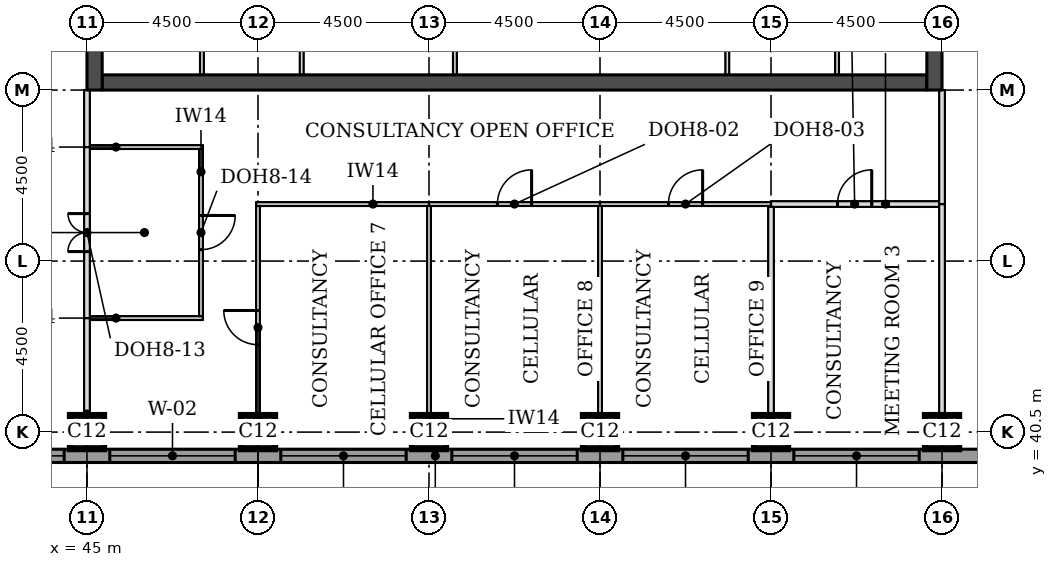
"""IFC4 building model, lengths in metres.
Left out: names, types, materials, properties, quantities, classifications, styles, units other than length and angle.
Written with IfcOpenShell. Run it as: python <this file> out.ifc"""

import sys

from ifc_helpers import new_model, si_unit, direction, frame, frame_2d, origin, origin_2d, place, context, subcontext, project, spatial, rectangle, extrude, element, fill, save


model = new_model("IFC4")
c1 = context("Model", 3, precision=1e-05, world=origin(), true_north=direction((0.0, 1.0)))
c2 = subcontext(c1, "Body", "Model", "MODEL_VIEW")
j1 = project(units=[si_unit("LENGTHUNIT", "METRE"), si_unit("PLANEANGLEUNIT", "RADIAN")], contexts=[c1])
p1 = place(None, origin())
s1 = spatial("IfcSite", under=j1, at=p1, CompositionType="ELEMENT")
p2 = place(p1, origin())
s2 = spatial("IfcBuilding", under=s1, at=p2, CompositionType="ELEMENT")
p3 = place(p2, frame((0.0, 0.0, 199.5)))
s3 = spatial("IfcBuildingStorey", under=s2, at=p3, CompositionType="ELEMENT", Elevation=199.5)
for number, where, z_axis, x_axis in (
    (1, (45.0, 40.5, 0.0), (0.0, 0.0, 1.0), (1.0, 0.0, 0.0)),
    (2, (49.5, 40.5, 0.0), (0.0, 0.0, 1.0), (1.0, 0.0, 0.0)),
    (3, (54.0, 40.5, 0.0), (0.0, 0.0, 1.0), (1.0, 0.0, 0.0)),
    (4, (58.5, 40.5, 0.0), (0.0, 0.0, 1.0), (1.0, 0.0, 0.0)),
    (5, (63.0, 40.5, 0.0), (0.0, 0.0, 1.0), (1.0, 0.0, 0.0)),
    (6, (67.5, 40.5, 0.0), (0.0, 0.0, 1.0), (1.0, 0.0, 0.0)),
):
    element("IfcColumn", number, at=place(p3, frame(where, z_axis=z_axis, x_axis=x_axis)), inside=s3, PredefinedType="COLUMN", context=c2, shape_type="SweptSolid", body=[
        extrude(rectangle(XDim=0.9, YDim=0.9, at=origin_2d()), origin(), (0.0, 0.0, 1.0), 3.7),
    ])
p4 = place(p3, frame((45.4, 49.7, 0.0), z_axis=(0.0, 0.0, 1.0), x_axis=(1.0, 0.0, 0.0)))
e7 = element("IfcWall", 7, at=p4, inside=s3, PredefinedType="SHEAR", context=c2, shape_type="SweptSolid", body=[
    extrude(rectangle(XDim=21.7, YDim=0.4, at=frame_2d((10.85, 0.0))), origin(), (0.0, 0.0, 1.0), 3.7),
])
p5 = place(p3, frame((45.2, 49.5, 0.0), z_axis=(0.0, 0.0, 1.0), x_axis=(0.0, 1.0, 0.0)))
e8 = element("IfcWall", 8, at=p5, inside=s3, PredefinedType="SHEAR", context=c2, shape_type="SweptSolid", body=[
    extrude(rectangle(XDim=22.5, YDim=0.4, at=frame_2d((11.25, 0.0))), origin(), (0.0, 0.0, 1.0), 3.7),
])
p6 = place(p5, frame((4.2, 0.0, 0.0)))
e9 = element("IfcOpeningElement", 9, at=p6, cuts=e8, PredefinedType="OPENING", context=c2, shape_type="SweptSolid", body=[
    extrude(rectangle(XDim=1.8, YDim=2.1, at=frame_2d((0.9, 1.05))), frame((0.0, 0.21, 0.0), z_axis=(0.0, -1.0, 0.0), x_axis=(1.0, 0.0, 0.0)), (0.0, 0.0, 1.0), 0.42),
])
p7 = place(p5, frame((6.9, 0.0, 0.0)))
e10 = element("IfcOpeningElement", 10, at=p7, cuts=e8, PredefinedType="OPENING", context=c2, shape_type="SweptSolid", body=[
    extrude(rectangle(XDim=1.1, YDim=2.1, at=frame_2d((0.55, 1.05))), frame((0.0, 0.21, 0.0), z_axis=(0.0, -1.0, 0.0), x_axis=(1.0, 0.0, 0.0)), (0.0, 0.0, 1.0), 0.42),
])
p8 = place(p5, frame((13.6, 0.0, 0.0)))
e11 = element("IfcOpeningElement", 11, at=p8, cuts=e8, PredefinedType="OPENING", context=c2, shape_type="SweptSolid", body=[
    extrude(rectangle(XDim=1.1, YDim=2.1, at=frame_2d((0.55, 1.05))), frame((0.0, 0.21, 0.0), z_axis=(0.0, -1.0, 0.0), x_axis=(1.0, 0.0, 0.0)), (0.0, 0.0, 1.0), 0.42),
])
p9 = place(p5, frame((16.5, 0.0, 0.0)))
e12 = element("IfcOpeningElement", 12, at=p9, cuts=e8, PredefinedType="OPENING", context=c2, shape_type="SweptSolid", body=[
    extrude(rectangle(XDim=1.8, YDim=2.1, at=frame_2d((0.9, 1.05))), frame((0.0, 0.21, 0.0), z_axis=(0.0, -1.0, 0.0), x_axis=(1.0, 0.0, 0.0)), (0.0, 0.0, 1.0), 0.42),
])
p10 = place(p3, frame((67.3, 49.5, 0.0), z_axis=(0.0, 0.0, 1.0), x_axis=(0.0, 1.0, 0.0)))
e13 = element("IfcWall", 13, at=p10, inside=s3, PredefinedType="SHEAR", context=c2, shape_type="SweptSolid", body=[
    extrude(rectangle(XDim=22.5, YDim=0.4, at=frame_2d((11.25, 0.0))), origin(), (0.0, 0.0, 1.0), 3.7),
])
p11 = place(p10, frame((4.2, 0.0, 0.0)))
e14 = element("IfcOpeningElement", 14, at=p11, cuts=e13, PredefinedType="OPENING", context=c2, shape_type="SweptSolid", body=[
    extrude(rectangle(XDim=1.8, YDim=2.1, at=frame_2d((0.9, 1.05))), frame((0.0, 0.21, 0.0), z_axis=(0.0, -1.0, 0.0), x_axis=(1.0, 0.0, 0.0)), (0.0, 0.0, 1.0), 0.42),
])
p12 = place(p10, frame((6.9, 0.0, 0.0)))
e15 = element("IfcOpeningElement", 15, at=p12, cuts=e13, PredefinedType="OPENING", context=c2, shape_type="SweptSolid", body=[
    extrude(rectangle(XDim=1.1, YDim=2.1, at=frame_2d((0.55, 1.05))), frame((0.0, 0.21, 0.0), z_axis=(0.0, -1.0, 0.0), x_axis=(1.0, 0.0, 0.0)), (0.0, 0.0, 1.0), 0.42),
])
p13 = place(p10, frame((13.6, 0.0, 0.0)))
e16 = element("IfcOpeningElement", 16, at=p13, cuts=e13, PredefinedType="OPENING", context=c2, shape_type="SweptSolid", body=[
    extrude(rectangle(XDim=1.1, YDim=2.1, at=frame_2d((0.55, 1.05))), frame((0.0, 0.21, 0.0), z_axis=(0.0, -1.0, 0.0), x_axis=(1.0, 0.0, 0.0)), (0.0, 0.0, 1.0), 0.42),
])
p14 = place(p10, frame((16.5, 0.0, 0.0)))
e17 = element("IfcOpeningElement", 17, at=p14, cuts=e13, PredefinedType="OPENING", context=c2, shape_type="SweptSolid", body=[
    extrude(rectangle(XDim=1.8, YDim=2.1, at=frame_2d((0.9, 1.05))), frame((0.0, 0.21, 0.0), z_axis=(0.0, -1.0, 0.0), x_axis=(1.0, 0.0, 0.0)), (0.0, 0.0, 1.0), 0.42),
])
p15 = place(p3, frame((36.0, 39.875, 0.0), z_axis=(0.0, 0.0, 1.0), x_axis=(1.0, 0.0, 0.0)))
e18 = element("IfcWall", 18, at=p15, inside=s3, PredefinedType="STANDARD", context=c2, shape_type="SweptSolid", body=[
    extrude(rectangle(XDim=36.331, YDim=0.35, at=frame_2d((18.166, 0.0))), origin(), (0.0, 0.0, 1.0), 3.525),
])
p16 = place(p15, frame((5.1, 0.0, 0.9)))
e19 = element("IfcOpeningElement", 19, at=p16, cuts=e18, PredefinedType="OPENING", context=c2, shape_type="SweptSolid", body=[
    extrude(rectangle(XDim=3.3, YDim=1.9, at=frame_2d((1.65, 0.95))), frame((0.0, 0.185, 0.0), z_axis=(0.0, -1.0, 0.0), x_axis=(1.0, 0.0, 0.0)), (0.0, 0.0, 1.0), 0.37),
])
p17 = place(p15, frame((9.6, 0.0, 0.9)))
e20 = element("IfcOpeningElement", 20, at=p17, cuts=e18, PredefinedType="OPENING", context=c2, shape_type="SweptSolid", body=[
    extrude(rectangle(XDim=3.3, YDim=1.9, at=frame_2d((1.65, 0.95))), frame((0.0, 0.185, 0.0), z_axis=(0.0, -1.0, 0.0), x_axis=(1.0, 0.0, 0.0)), (0.0, 0.0, 1.0), 0.37),
])
p18 = place(p15, frame((14.1, 0.0, 0.9)))
e21 = element("IfcOpeningElement", 21, at=p18, cuts=e18, PredefinedType="OPENING", context=c2, shape_type="SweptSolid", body=[
    extrude(rectangle(XDim=3.3, YDim=1.9, at=frame_2d((1.65, 0.95))), frame((0.0, 0.185, 0.0), z_axis=(0.0, -1.0, 0.0), x_axis=(1.0, 0.0, 0.0)), (0.0, 0.0, 1.0), 0.37),
])
p19 = place(p15, frame((18.6, 0.0, 0.9)))
e22 = element("IfcOpeningElement", 22, at=p19, cuts=e18, PredefinedType="OPENING", context=c2, shape_type="SweptSolid", body=[
    extrude(rectangle(XDim=3.3, YDim=1.9, at=frame_2d((1.65, 0.95))), frame((0.0, 0.185, 0.0), z_axis=(0.0, -1.0, 0.0), x_axis=(1.0, 0.0, 0.0)), (0.0, 0.0, 1.0), 0.37),
])
p20 = place(p15, frame((23.1, 0.0, 0.9)))
e23 = element("IfcOpeningElement", 23, at=p20, cuts=e18, PredefinedType="OPENING", context=c2, shape_type="SweptSolid", body=[
    extrude(rectangle(XDim=3.3, YDim=1.9, at=frame_2d((1.65, 0.95))), frame((0.0, 0.185, 0.0), z_axis=(0.0, -1.0, 0.0), x_axis=(1.0, 0.0, 0.0)), (0.0, 0.0, 1.0), 0.37),
])
p21 = place(p15, frame((27.6, 0.0, 0.9)))
e24 = element("IfcOpeningElement", 24, at=p21, cuts=e18, PredefinedType="OPENING", context=c2, shape_type="SweptSolid", body=[
    extrude(rectangle(XDim=3.3, YDim=1.9, at=frame_2d((1.65, 0.95))), frame((0.0, 0.185, 0.0), z_axis=(0.0, -1.0, 0.0), x_axis=(1.0, 0.0, 0.0)), (0.0, 0.0, 1.0), 0.37),
])
p22 = place(p3, frame((45.075, 43.5, 0.0), z_axis=(0.0, 0.0, 1.0), x_axis=(1.0, 0.0, 0.0)))
e25 = element("IfcWall", 25, at=p22, inside=s3, PredefinedType="PARTITIONING", context=c2, shape_type="SweptSolid", body=[
    extrude(rectangle(XDim=2.975, YDim=0.1, at=frame_2d((1.488, 0.0))), origin(), (0.0, 0.0, 1.0), 3.55),
])
p23 = place(p3, frame((49.45, 46.5, 0.0), z_axis=(0.0, 0.0, 1.0), x_axis=(1.0, 0.0, 0.0)))
e26 = element("IfcWall", 26, at=p23, inside=s3, PredefinedType="PARTITIONING", context=c2, shape_type="SweptSolid", body=[
    extrude(rectangle(XDim=4.55, YDim=0.1, at=frame_2d((2.275, 0.0))), origin(), (0.0, 0.0, 1.0), 3.55),
])
p24 = place(p3, frame((54.0, 46.5, 0.0), z_axis=(0.0, 0.0, 1.0), x_axis=(1.0, 0.0, 0.0)))
e27 = element("IfcWall", 27, at=p24, inside=s3, PredefinedType="PARTITIONING", context=c2, shape_type="SweptSolid", body=[
    extrude(rectangle(XDim=4.5, YDim=0.1, at=frame_2d((2.25, 0.0))), origin(), (0.0, 0.0, 1.0), 3.55),
])
p25 = place(p24, frame((1.8, 0.0, 0.0)))
e28 = element("IfcOpeningElement", 28, at=p25, cuts=e27, PredefinedType="OPENING", context=c2, shape_type="SweptSolid", body=[
    extrude(rectangle(XDim=0.9, YDim=2.1, at=frame_2d((0.45, 1.05))), frame((0.0, 0.06, 0.0), z_axis=(0.0, -1.0, 0.0), x_axis=(1.0, 0.0, 0.0)), (0.0, 0.0, 1.0), 0.12),
])
p26 = place(p3, frame((58.5, 46.5, 0.0), z_axis=(0.0, 0.0, 1.0), x_axis=(1.0, 0.0, 0.0)))
e29 = element("IfcWall", 29, at=p26, inside=s3, PredefinedType="PARTITIONING", context=c2, shape_type="SweptSolid", body=[
    extrude(rectangle(XDim=4.5, YDim=0.1, at=frame_2d((2.25, 0.0))), origin(), (0.0, 0.0, 1.0), 3.55),
])
p27 = place(p26, frame((1.8, 0.0, 0.0)))
e30 = element("IfcOpeningElement", 30, at=p27, cuts=e29, PredefinedType="OPENING", context=c2, shape_type="SweptSolid", body=[
    extrude(rectangle(XDim=0.9, YDim=2.1, at=frame_2d((0.45, 1.05))), frame((0.0, 0.06, 0.0), z_axis=(0.0, -1.0, 0.0), x_axis=(1.0, 0.0, 0.0)), (0.0, 0.0, 1.0), 0.12),
])
p28 = place(p3, frame((63.0, 46.5, 0.0), z_axis=(0.0, 0.0, 1.0), x_axis=(1.0, 0.0, 0.0)))
e31 = element("IfcWall", 31, at=p28, inside=s3, PredefinedType="PARTITIONING", context=c2, shape_type="SweptSolid", body=[
    extrude(rectangle(XDim=4.425, YDim=0.15, at=frame_2d((2.212, 0.0))), origin(), (0.0, 0.0, 1.0), 3.55),
])
p29 = place(p28, frame((1.75, 0.0, 0.0)))
e32 = element("IfcOpeningElement", 32, at=p29, cuts=e31, PredefinedType="OPENING", context=c2, shape_type="SweptSolid", body=[
    extrude(rectangle(XDim=0.9, YDim=2.1, at=frame_2d((0.45, 1.05))), frame((0.0, 0.085, 0.0), z_axis=(0.0, -1.0, 0.0), x_axis=(1.0, 0.0, 0.0)), (0.0, 0.0, 1.0), 0.17),
])
p30 = place(p3, frame((45.075, 48.0, 0.0), z_axis=(0.0, 0.0, 1.0), x_axis=(1.0, 0.0, 0.0)))
e33 = element("IfcWall", 33, at=p30, inside=s3, PredefinedType="PARTITIONING", context=c2, shape_type="SweptSolid", body=[
    extrude(rectangle(XDim=2.975, YDim=0.1, at=frame_2d((1.488, 0.0))), origin(), (0.0, 0.0, 1.0), 3.55),
])
p31 = place(p3, frame((45.0, 40.05, 0.0), z_axis=(0.0, 0.0, 1.0), x_axis=(0.0, 1.0, 0.0)))
e34 = element("IfcWall", 34, at=p31, inside=s3, PredefinedType="PARTITIONING", context=c2, shape_type="SweptSolid", body=[
    extrude(rectangle(XDim=3.45, YDim=0.15, at=frame_2d((1.725, 0.0))), origin(), (0.0, 0.0, 1.0), 3.022),
])
p32 = place(p3, frame((49.5, 40.05, 0.0), z_axis=(0.0, 0.0, 1.0), x_axis=(0.0, 1.0, 0.0)))
e35 = element("IfcWall", 35, at=p32, inside=s3, PredefinedType="PARTITIONING", context=c2, shape_type="SweptSolid", body=[
    extrude(rectangle(XDim=6.4, YDim=0.1, at=frame_2d((3.2, 0.0))), origin(), (0.0, 0.0, 1.0), 3.55),
])
p33 = place(p32, frame((2.75, 0.0, 0.0)))
e36 = element("IfcOpeningElement", 36, at=p33, cuts=e35, PredefinedType="OPENING", context=c2, shape_type="SweptSolid", body=[
    extrude(rectangle(XDim=0.9, YDim=2.1, at=frame_2d((0.45, 1.05))), frame((0.0, 0.06, 0.0), z_axis=(0.0, -1.0, 0.0), x_axis=(1.0, 0.0, 0.0)), (0.0, 0.0, 1.0), 0.12),
])
for number, where, z_axis, x_axis in (
    (37, (54.0, 40.05, 0.0), (0.0, 0.0, 1.0), (0.0, 1.0, 0.0)),
    (38, (58.5, 40.05, 0.0), (0.0, 0.0, 1.0), (0.0, 1.0, 0.0)),
):
    element("IfcWall", number, at=place(p3, frame(where, z_axis=z_axis, x_axis=x_axis)), inside=s3, PredefinedType="PARTITIONING", context=c2, shape_type="SweptSolid", body=[
        extrude(rectangle(XDim=6.4, YDim=0.1, at=frame_2d((3.2, 0.0))), origin(), (0.0, 0.0, 1.0), 3.55),
    ])
p34 = place(p3, frame((63.0, 40.05, 0.0), z_axis=(0.0, 0.0, 1.0), x_axis=(0.0, 1.0, 0.0)))
e39 = element("IfcWall", 39, at=p34, inside=s3, PredefinedType="PARTITIONING", context=c2, shape_type="SweptSolid", body=[
    extrude(rectangle(XDim=6.375, YDim=0.15, at=frame_2d((3.188, 0.0))), origin(), (0.0, 0.0, 1.0), 3.55),
])
p35 = place(p3, frame((67.5, 40.05, 0.0), z_axis=(0.0, 0.0, 1.0), x_axis=(0.0, 1.0, 0.0)))
e40 = element("IfcWall", 40, at=p35, inside=s3, PredefinedType="PARTITIONING", context=c2, shape_type="SweptSolid", body=[
    extrude(rectangle(XDim=6.45, YDim=0.15, at=frame_2d((3.225, 0.0))), origin(), (0.0, 0.0, 1.0), 3.022),
])
p36 = place(p3, frame((45.0, 43.5, 0.0), z_axis=(0.0, 0.0, 1.0), x_axis=(0.0, 1.0, 0.0)))
e41 = element("IfcWall", 41, at=p36, inside=s3, PredefinedType="PARTITIONING", context=c2, shape_type="SweptSolid", body=[
    extrude(rectangle(XDim=4.5, YDim=0.15, at=frame_2d((2.25, 0.0))), origin(), (0.0, 0.0, 1.0), 3.022),
])
p37 = place(p36, frame((1.75, 0.0, 0.0)))
e42 = element("IfcOpeningElement", 42, at=p37, cuts=e41, PredefinedType="OPENING", context=c2, shape_type="SweptSolid", body=[
    extrude(rectangle(XDim=1.0, YDim=2.1, at=frame_2d((0.5, 1.05))), frame((0.0, 0.085, 0.0), z_axis=(0.0, -1.0, 0.0), x_axis=(1.0, 0.0, 0.0)), (0.0, 0.0, 1.0), 0.17),
])
p38 = place(p3, frame((48.0, 43.55, 0.0), z_axis=(0.0, 0.0, 1.0), x_axis=(0.0, 1.0, 0.0)))
e43 = element("IfcWall", 43, at=p38, inside=s3, PredefinedType="PARTITIONING", context=c2, shape_type="SweptSolid", body=[
    extrude(rectangle(XDim=4.4, YDim=0.1, at=frame_2d((2.2, 0.0))), origin(), (0.0, 0.0, 1.0), 3.55),
])
p39 = place(p38, frame((1.75, 0.0, 0.0)))
e44 = element("IfcOpeningElement", 44, at=p39, cuts=e43, PredefinedType="OPENING", context=c2, shape_type="SweptSolid", body=[
    extrude(rectangle(XDim=0.9, YDim=2.1, at=frame_2d((0.45, 1.05))), frame((0.0, 0.06, 0.0), z_axis=(0.0, -1.0, 0.0), x_axis=(1.0, 0.0, 0.0)), (0.0, 0.0, 1.0), 0.12),
])
p40 = place(p3, frame((67.5, 46.5, 0.0), z_axis=(0.0, 0.0, 1.0), x_axis=(0.0, 1.0, 0.0)))
e45 = element("IfcWall", 45, at=p40, inside=s3, PredefinedType="PARTITIONING", context=c2, shape_type="SweptSolid", body=[
    extrude(rectangle(XDim=3.0, YDim=0.15, at=frame_2d((1.5, 0.0))), origin(), (0.0, 0.0, 1.0), 3.022),
])
p41 = place(p3, frame((45.0, 48.0, 0.0), z_axis=(0.0, 0.0, 1.0), x_axis=(0.0, 1.0, 0.0)))
e46 = element("IfcWall", 46, at=p41, inside=s3, PredefinedType="PARTITIONING", context=c2, shape_type="SweptSolid", body=[
    extrude(rectangle(XDim=1.5, YDim=0.15, at=frame_2d((0.75, 0.0))), origin(), (0.0, 0.0, 1.0), 3.022),
])
for number, where, z_axis, x_axis in (
    (47, (48.025, 49.9, 0.0), (0.0, 0.0, 1.0), (0.0, 1.0, 0.0)),
    (48, (50.65, 49.9, 0.0), (0.0, 0.0, 1.0), (0.0, 1.0, 0.0)),
    (49, (54.682, 49.9, 0.0), (0.0, 0.0, 1.0), (0.0, 1.0, 0.0)),
    (50, (61.85, 49.9, 0.0), (0.0, 0.0, 1.0), (0.0, 1.0, 0.0)),
    (51, (64.738, 49.9, 0.0), (0.0, 0.0, 1.0), (0.0, 1.0, 0.0)),
):
    element("IfcWall", number, at=place(p3, frame(where, z_axis=z_axis, x_axis=x_axis)), inside=s3, PredefinedType="PARTITIONING", context=c2, shape_type="SweptSolid", body=[
        extrude(rectangle(XDim=3.1, YDim=0.1, at=frame_2d((1.55, 0.0))), origin(), (0.0, 0.0, 1.0), 3.55),
    ])
p42 = place(p16, origin())
e52 = element("IfcWindow", 52, at=p42, inside=s3, PartitioningType="SINGLE_PANEL", PredefinedType="WINDOW", context=c2, shape_type="SweptSolid", body=[
    extrude(rectangle(XDim=3.3, YDim=1.9, at=frame_2d((1.65, 0.95))), frame((0.0, 0.085, 0.0), z_axis=(0.0, -1.0, 0.0), x_axis=(1.0, 0.0, 0.0)), (0.0, 0.0, 1.0), 0.06),
])
fill(e19, e52)
p43 = place(p17, origin())
e53 = element("IfcWindow", 53, at=p43, inside=s3, PartitioningType="SINGLE_PANEL", PredefinedType="WINDOW", context=c2, shape_type="SweptSolid", body=[
    extrude(rectangle(XDim=3.3, YDim=1.9, at=frame_2d((1.65, 0.95))), frame((0.0, 0.085, 0.0), z_axis=(0.0, -1.0, 0.0), x_axis=(1.0, 0.0, 0.0)), (0.0, 0.0, 1.0), 0.06),
])
fill(e20, e53)
p44 = place(p18, origin())
e54 = element("IfcWindow", 54, at=p44, inside=s3, PartitioningType="SINGLE_PANEL", PredefinedType="WINDOW", context=c2, shape_type="SweptSolid", body=[
    extrude(rectangle(XDim=3.3, YDim=1.9, at=frame_2d((1.65, 0.95))), frame((0.0, 0.085, 0.0), z_axis=(0.0, -1.0, 0.0), x_axis=(1.0, 0.0, 0.0)), (0.0, 0.0, 1.0), 0.06),
])
fill(e21, e54)
p45 = place(p19, origin())
e55 = element("IfcWindow", 55, at=p45, inside=s3, PartitioningType="SINGLE_PANEL", PredefinedType="WINDOW", context=c2, shape_type="SweptSolid", body=[
    extrude(rectangle(XDim=3.3, YDim=1.9, at=frame_2d((1.65, 0.95))), frame((0.0, 0.085, 0.0), z_axis=(0.0, -1.0, 0.0), x_axis=(1.0, 0.0, 0.0)), (0.0, 0.0, 1.0), 0.06),
])
fill(e22, e55)
p46 = place(p20, origin())
e56 = element("IfcWindow", 56, at=p46, inside=s3, PartitioningType="SINGLE_PANEL", PredefinedType="WINDOW", context=c2, shape_type="SweptSolid", body=[
    extrude(rectangle(XDim=3.3, YDim=1.9, at=frame_2d((1.65, 0.95))), frame((0.0, 0.085, 0.0), z_axis=(0.0, -1.0, 0.0), x_axis=(1.0, 0.0, 0.0)), (0.0, 0.0, 1.0), 0.06),
])
fill(e23, e56)
p47 = place(p21, origin())
e57 = element("IfcWindow", 57, at=p47, inside=s3, PartitioningType="SINGLE_PANEL", PredefinedType="WINDOW", context=c2, shape_type="SweptSolid", body=[
    extrude(rectangle(XDim=3.3, YDim=1.9, at=frame_2d((1.65, 0.95))), frame((0.0, 0.085, 0.0), z_axis=(0.0, -1.0, 0.0), x_axis=(1.0, 0.0, 0.0)), (0.0, 0.0, 1.0), 0.06),
])
fill(e24, e57)
p48 = place(p37, origin())
e58 = element("IfcDoor", 58, at=p48, inside=s3, OperationType="DOUBLE_DOOR_SINGLE_SWING", PredefinedType="DOOR", context=c2, shape_type="SweptSolid", body=[
    extrude(rectangle(XDim=1.0, YDim=2.1, at=frame_2d((0.5, 1.05))), frame((0.0, 0.025, 0.0), z_axis=(0.0, -1.0, 0.0), x_axis=(1.0, 0.0, 0.0)), (0.0, 0.0, 1.0), 0.05),
])
fill(e42, e58)
p49 = place(p39, frame((0.9, 0.0, 0.0), z_axis=(0.0, 0.0, 1.0), x_axis=(-1.0, 0.0, 0.0)))
e59 = element("IfcDoor", 59, at=p49, inside=s3, OperationType="SINGLE_SWING_LEFT", PredefinedType="DOOR", context=c2, shape_type="SweptSolid", body=[
    extrude(rectangle(XDim=0.9, YDim=2.1, at=frame_2d((0.45, 1.05))), frame((0.0, 0.025, 0.0), z_axis=(0.0, -1.0, 0.0), x_axis=(1.0, 0.0, 0.0)), (0.0, 0.0, 1.0), 0.05),
])
fill(e44, e59)
p50 = place(p33, origin())
e60 = element("IfcDoor", 60, at=p50, inside=s3, OperationType="SINGLE_SWING_RIGHT", PredefinedType="DOOR", context=c2, shape_type="SweptSolid", body=[
    extrude(rectangle(XDim=0.9, YDim=2.1, at=frame_2d((0.45, 1.05))), frame((0.0, 0.025, 0.0), z_axis=(0.0, -1.0, 0.0), x_axis=(1.0, 0.0, 0.0)), (0.0, 0.0, 1.0), 0.05),
])
fill(e36, e60)
p51 = place(p25, origin())
e61 = element("IfcDoor", 61, at=p51, inside=s3, OperationType="SINGLE_SWING_RIGHT", PredefinedType="DOOR", context=c2, shape_type="SweptSolid", body=[
    extrude(rectangle(XDim=0.9, YDim=2.1, at=frame_2d((0.45, 1.05))), frame((0.0, 0.025, 0.0), z_axis=(0.0, -1.0, 0.0), x_axis=(1.0, 0.0, 0.0)), (0.0, 0.0, 1.0), 0.05),
])
fill(e28, e61)
p52 = place(p27, origin())
e62 = element("IfcDoor", 62, at=p52, inside=s3, OperationType="SINGLE_SWING_RIGHT", PredefinedType="DOOR", context=c2, shape_type="SweptSolid", body=[
    extrude(rectangle(XDim=0.9, YDim=2.1, at=frame_2d((0.45, 1.05))), frame((0.0, 0.025, 0.0), z_axis=(0.0, -1.0, 0.0), x_axis=(1.0, 0.0, 0.0)), (0.0, 0.0, 1.0), 0.05),
])
fill(e30, e62)
p53 = place(p29, origin())
e63 = element("IfcDoor", 63, at=p53, inside=s3, OperationType="SINGLE_SWING_RIGHT", PredefinedType="DOOR", context=c2, shape_type="SweptSolid", body=[
    extrude(rectangle(XDim=0.9, YDim=2.1, at=frame_2d((0.45, 1.05))), frame((0.0, 0.025, 0.0), z_axis=(0.0, -1.0, 0.0), x_axis=(1.0, 0.0, 0.0)), (0.0, 0.0, 1.0), 0.05),
])
fill(e32, e63)
save(model, sys.argv[1])
